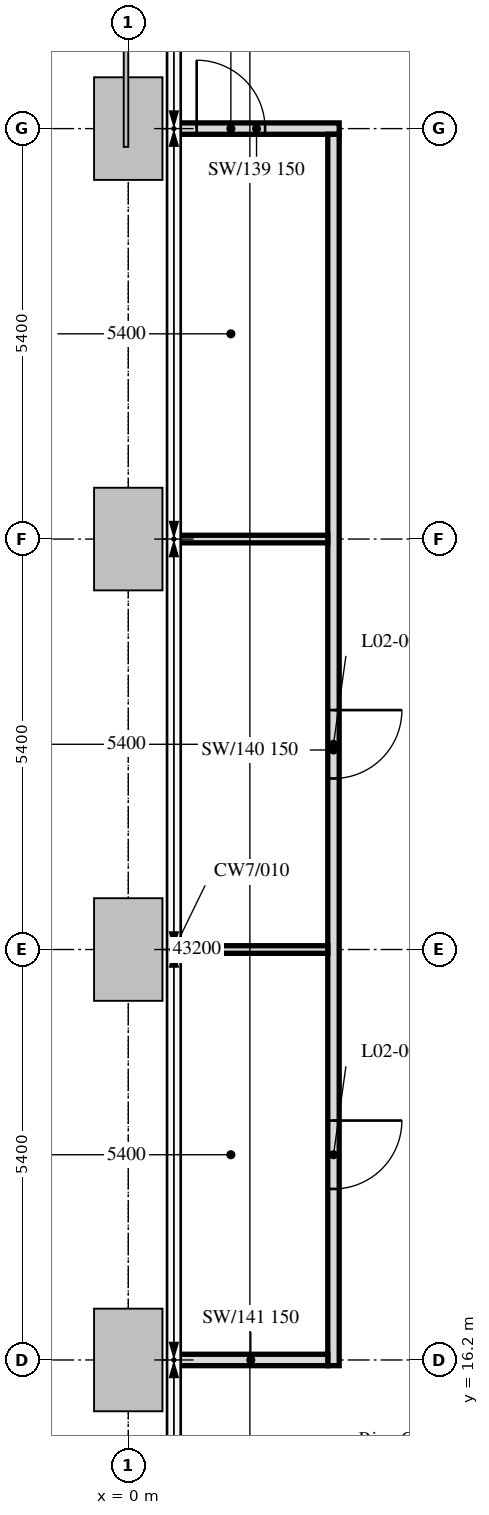
"""IFC4 building model, lengths in metres.
Left out: names, types, materials, properties, quantities, classifications, styles, units other than length and angle.
Written with IfcOpenShell. Run it as: python <this file> out.ifc"""

import sys

from ifc_helpers import new_model, si_unit, direction, frame, frame_2d, origin, place, context, subcontext, project, spatial, rectangle, extrude, element, fill, save


model = new_model("IFC4")
c1 = context("Model", 3, precision=1e-05, world=origin(), true_north=direction((0.0, 1.0)))
c2 = subcontext(c1, "Body", "Model", "MODEL_VIEW")
j1 = project(units=[si_unit("LENGTHUNIT", "METRE"), si_unit("PLANEANGLEUNIT", "RADIAN")], contexts=[c1])
p1 = place(None, origin())
s1 = spatial("IfcSite", under=j1, at=p1, CompositionType="ELEMENT")
p2 = place(p1, origin())
s2 = spatial("IfcBuilding", under=s1, at=p2, CompositionType="ELEMENT")
p3 = place(p2, frame((0.0, 0.0, 14.4)))
s3 = spatial("IfcBuildingStorey", under=s2, at=p3, CompositionType="ELEMENT", Elevation=14.4)
p4 = place(p3, frame((0.6, 32.4, 0.0), z_axis=(0.0, 0.0, 1.0), x_axis=(1.0, 0.0, 0.0)))
e1 = element("IfcWall", 1, at=p4, inside=s3, PredefinedType="PARTITIONING", context=c2, shape_type="SweptSolid", body=[
    extrude(rectangle(XDim=2.175, YDim=0.15, at=frame_2d((1.087, 0.0))), origin(), (0.0, 0.0, 1.0), 4.25),
])
p5 = place(p4, frame((0.3, 0.0, 0.0)))
e2 = element("IfcOpeningElement", 2, at=p5, cuts=e1, PredefinedType="OPENING", context=c2, shape_type="SweptSolid", body=[
    extrude(rectangle(XDim=0.9, YDim=2.1, at=frame_2d((0.45, 1.05))), frame((0.0, 0.075, 0.0), z_axis=(0.0, -1.0, 0.0), x_axis=(1.0, 0.0, 0.0)), (0.0, 0.0, 1.0), 0.15),
])
p6 = place(p3, frame((2.7, 32.325, 0.0), z_axis=(0.0, 0.0, 1.0), x_axis=(0.0, -1.0, 0.0)))
e3 = element("IfcWall", 3, at=p6, inside=s3, PredefinedType="PARTITIONING", context=c2, shape_type="SweptSolid", body=[
    extrude(rectangle(XDim=16.2, YDim=0.15, at=frame_2d((8.1, 0.0))), origin(), (0.0, 0.0, 1.0), 4.25),
])
p7 = place(p6, frame((12.975, 0.0, 0.0)))
e4 = element("IfcOpeningElement", 4, at=p7, cuts=e3, PredefinedType="OPENING", context=c2, shape_type="SweptSolid", body=[
    extrude(rectangle(XDim=0.9, YDim=2.1, at=frame_2d((0.45, 1.05))), frame((0.0, 0.075, 0.0), z_axis=(0.0, -1.0, 0.0), x_axis=(1.0, 0.0, 0.0)), (0.0, 0.0, 1.0), 0.15),
])
p8 = place(p6, frame((7.575, 0.0, 0.0)))
e5 = element("IfcOpeningElement", 5, at=p8, cuts=e3, PredefinedType="OPENING", context=c2, shape_type="SweptSolid", body=[
    extrude(rectangle(XDim=0.9, YDim=2.1, at=frame_2d((0.45, 1.05))), frame((0.0, 0.075, 0.0), z_axis=(0.0, -1.0, 0.0), x_axis=(1.0, 0.0, 0.0)), (0.0, 0.0, 1.0), 0.15),
])
p9 = place(p3, frame((2.625, 16.2, 0.0), z_axis=(0.0, 0.0, 1.0), x_axis=(-1.0, 0.0, 0.0)))
e6 = element("IfcWall", 6, at=p9, inside=s3, PredefinedType="PARTITIONING", context=c2, shape_type="SweptSolid", body=[
    extrude(rectangle(XDim=2.025, YDim=0.15, at=frame_2d((1.012, 0.0))), origin(), (0.0, 0.0, 1.0), 5.0),
])
for number, where, z_axis, x_axis in (
    (7, (2.625, 21.6, 0.0), (0.0, 0.0, 1.0), (-1.0, 0.0, 0.0)),
    (8, (2.625, 27.0, 0.0), (0.0, 0.0, 1.0), (-1.0, 0.0, 0.0)),
):
    element("IfcWall", number, at=place(p3, frame(where, z_axis=z_axis, x_axis=x_axis)), inside=s3, PredefinedType="PARTITIONING", context=c2, shape_type="SweptSolid", body=[
        extrude(rectangle(XDim=2.025, YDim=0.1, at=frame_2d((1.012, 0.0))), origin(), (0.0, 0.0, 1.0), 5.0),
    ])
p10 = place(p7, origin())
e9 = element("IfcDoor", 9, at=p10, inside=s3, OperationType="SINGLE_SWING_LEFT", PredefinedType="DOOR", context=c2, shape_type="SweptSolid", body=[
    extrude(rectangle(XDim=0.9, YDim=2.1, at=frame_2d((0.45, 1.05))), frame((0.0, 0.025, 0.0), z_axis=(0.0, -1.0, 0.0), x_axis=(1.0, 0.0, 0.0)), (0.0, 0.0, 1.0), 0.05),
])
fill(e4, e9)
p11 = place(p8, origin())
e10 = element("IfcDoor", 10, at=p11, inside=s3, OperationType="SINGLE_SWING_LEFT", PredefinedType="DOOR", context=c2, shape_type="SweptSolid", body=[
    extrude(rectangle(XDim=0.9, YDim=2.1, at=frame_2d((0.45, 1.05))), frame((0.0, 0.025, 0.0), z_axis=(0.0, -1.0, 0.0), x_axis=(1.0, 0.0, 0.0)), (0.0, 0.0, 1.0), 0.05),
])
fill(e5, e10)
p12 = place(p5, origin())
e11 = element("IfcDoor", 11, at=p12, inside=s3, OperationType="SINGLE_SWING_LEFT", PredefinedType="DOOR", context=c2, shape_type="SweptSolid", body=[
    extrude(rectangle(XDim=0.9, YDim=2.1, at=frame_2d((0.45, 1.05))), frame((0.0, 0.025, 0.0), z_axis=(0.0, -1.0, 0.0), x_axis=(1.0, 0.0, 0.0)), (0.0, 0.0, 1.0), 0.05),
])
fill(e2, e11)
save(model, sys.argv[1])
